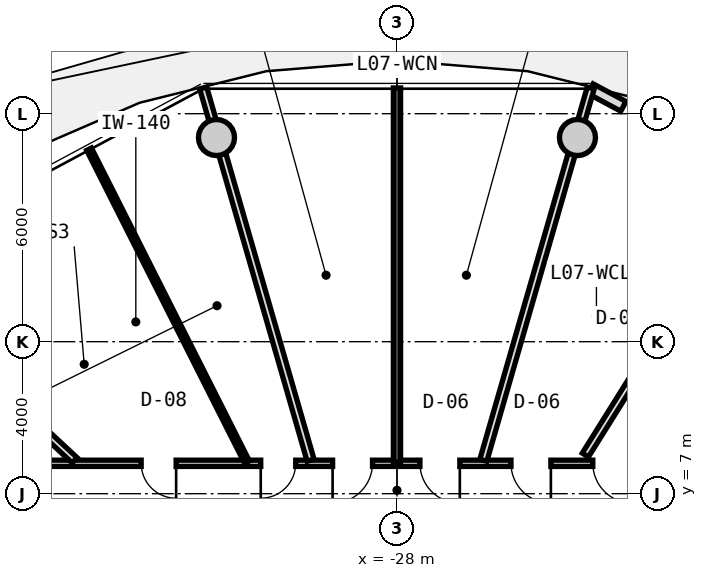
"""IFC4 building model, lengths in metres.
Left out: names, types, materials, properties, quantities, classifications, styles, units other than length and angle.
Written with IfcOpenShell. Run it as: python <this file> out.ifc"""

import sys

from ifc_helpers import new_model, si_unit, direction, frame, frame_2d, origin, origin_2d, place, context, subcontext, project, spatial, rectangle, circle, extrude, source, transform, mapped, element, fill, save


model = new_model("IFC4")
c1 = context("Model", 3, precision=1e-05, world=origin(), true_north=direction((0.0, 1.0)))
c2 = subcontext(c1, "Body", "Model", "MODEL_VIEW")
j1 = project(units=[si_unit("LENGTHUNIT", "METRE"), si_unit("PLANEANGLEUNIT", "RADIAN")], contexts=[c1])
p1 = place(None, origin())
s1 = spatial("IfcSite", under=j1, at=p1, CompositionType="ELEMENT")
p2 = place(p1, origin())
s2 = spatial("IfcBuilding", under=s1, at=p2, CompositionType="ELEMENT")
p3 = place(p2, frame((0.0, 0.0, 27.7)))
s3 = spatial("IfcBuildingStorey", under=s2, at=p3, CompositionType="ELEMENT", Elevation=27.7)
m1 = source(origin(), c2, "Body", "SweptSolid", [
    extrude(circle(Radius=0.475, at=origin_2d()), origin(), (0.0, 0.0, 1.0), 3.05),
])
for number, where, z_axis, x_axis in (
    (1, (-23.251, 16.373, 0.0), (0.0, 0.0, 1.0), (1.0, 0.0, 0.0)),
    (2, (-32.749, 16.373, 0.0), (0.0, 0.0, 1.0), (1.0, 0.0, 0.0)),
):
    element("IfcColumn", number, at=place(p3, frame(where, z_axis=z_axis, x_axis=x_axis)), inside=s3, PredefinedType="COLUMN", context=c2, shape_type="MappedRepresentation", body=[
        mapped(m1, transform((0.0, 0.0, 0.0), x_axis=(1.0, 0.0, 0.0), y_axis=(0.0, 1.0, 0.0), z_axis=(0.0, 0.0, 1.0), scale=1.0)),
    ])
m2 = source(origin(), c2, "Body", "SweptSolid", [
    extrude(rectangle(XDim=10.011, YDim=0.29, at=frame_2d((5.005, 0.0))), origin(), (0.0, 0.0, 1.0), 2.79),
])
p4 = place(p3, frame((-22.906, 17.657, 0.0), z_axis=(0.0, 0.0, 1.0), x_axis=(0.881272505317, -0.472608475773, 0.0)))
e3 = element("IfcWall", 3, at=p4, inside=s3, PredefinedType="SOLIDWALL", context=c2, shape_type="MappedRepresentation", body=[
    mapped(m2, transform((0.0, 0.0, 0.0), x_axis=(1.0, 0.0, 0.0), y_axis=(0.0, 1.0, 0.0), z_axis=(0.0, 0.0, 1.0), scale=1.0)),
])
p5 = place(p4, frame((0.98, 0.0, 0.0)))
e4 = element("IfcOpeningElement", 4, at=p5, cuts=e3, PredefinedType="OPENING", context=c2, shape_type="SweptSolid", body=[
    extrude(rectangle(XDim=1.15, YDim=2.25, at=frame_2d((0.575, 1.125))), frame((0.0, 0.155, 0.0), z_axis=(0.0, -1.0, 0.0), x_axis=(1.0, 0.0, 0.0)), (0.0, 0.0, 1.0), 0.31),
])
p6 = place(p4, frame((5.535, 0.0, 0.85)))
e5 = element("IfcOpeningElement", 5, at=p6, cuts=e3, PredefinedType="OPENING", context=c2, shape_type="SweptSolid", body=[
    extrude(rectangle(XDim=1.2, YDim=1.5, at=frame_2d((0.6, 0.75))), frame((0.0, 0.155, 0.0), z_axis=(0.0, -1.0, 0.0), x_axis=(1.0, 0.0, 0.0)), (0.0, 0.0, 1.0), 0.31),
])
m3 = source(origin(), c2, "Body", "SweptSolid", [
    extrude(rectangle(XDim=19.0, YDim=0.165, at=frame_2d((9.5, 0.0))), origin(), (0.0, 0.0, 1.0), 2.775),
])
p7 = place(p3, frame((-37.5, 7.8, 0.0), z_axis=(0.0, 0.0, 1.0), x_axis=(1.0, 0.0, 0.0)))
e6 = element("IfcWall", 6, at=p7, inside=s3, PredefinedType="PARTITIONING", context=c2, shape_type="MappedRepresentation", body=[
    mapped(m3, transform((0.0, 0.0, 0.0), x_axis=(1.0, 0.0, 0.0), y_axis=(0.0, 1.0, 0.0), z_axis=(0.0, 0.0, 1.0), scale=1.0)),
])
p8 = place(p7, frame((14.653, 0.0, 0.0)))
e7 = element("IfcOpeningElement", 7, at=p8, cuts=e6, PredefinedType="OPENING", context=c2, shape_type="SweptSolid", body=[
    extrude(rectangle(XDim=1.05, YDim=2.15, at=frame_2d((0.525, 1.075))), frame((0.0, 0.093, 0.0), z_axis=(0.0, -1.0, 0.0), x_axis=(1.0, 0.0, 0.0)), (0.0, 0.0, 1.0), 0.185),
])
p9 = place(p7, frame((12.5, 0.0, 0.0)))
e8 = element("IfcOpeningElement", 8, at=p9, cuts=e6, PredefinedType="OPENING", context=c2, shape_type="SweptSolid", body=[
    extrude(rectangle(XDim=1.05, YDim=2.15, at=frame_2d((0.525, 1.075))), frame((0.0, 0.093, 0.0), z_axis=(0.0, -1.0, 0.0), x_axis=(1.0, 0.0, 0.0)), (0.0, 0.0, 1.0), 0.185),
])
p10 = place(p7, frame((10.104, 0.0, 0.0)))
e9 = element("IfcOpeningElement", 9, at=p10, cuts=e6, PredefinedType="OPENING", context=c2, shape_type="SweptSolid", body=[
    extrude(rectangle(XDim=1.05, YDim=2.15, at=frame_2d((0.525, 1.075))), frame((0.0, 0.093, 0.0), z_axis=(0.0, -1.0, 0.0), x_axis=(1.0, 0.0, 0.0)), (0.0, 0.0, 1.0), 0.185),
])
p11 = place(p7, frame((7.806, 0.0, 0.0)))
e10 = element("IfcOpeningElement", 10, at=p11, cuts=e6, PredefinedType="OPENING", context=c2, shape_type="SweptSolid", body=[
    extrude(rectangle(XDim=1.05, YDim=2.15, at=frame_2d((0.525, 1.075))), frame((0.0, 0.093, 0.0), z_axis=(0.0, -1.0, 0.0), x_axis=(1.0, 0.0, 0.0)), (0.0, 0.0, 1.0), 0.185),
])
p12 = place(p7, frame((5.915, 0.0, 0.0)))
e11 = element("IfcOpeningElement", 11, at=p12, cuts=e6, PredefinedType="OPENING", context=c2, shape_type="SweptSolid", body=[
    extrude(rectangle(XDim=0.92, YDim=2.1, at=frame_2d((0.46, 1.05))), frame((0.0, 0.093, 0.0), z_axis=(0.0, -1.0, 0.0), x_axis=(1.0, 0.0, 0.0)), (0.0, 0.0, 1.0), 0.185),
])
p13 = place(p7, frame((2.769, 0.0, 0.0)))
e12 = element("IfcOpeningElement", 12, at=p13, cuts=e6, PredefinedType="OPENING", context=c2, shape_type="SweptSolid", body=[
    extrude(rectangle(XDim=0.92, YDim=2.1, at=frame_2d((0.46, 1.05))), frame((0.0, 0.093, 0.0), z_axis=(0.0, -1.0, 0.0), x_axis=(1.0, 0.0, 0.0)), (0.0, 0.0, 1.0), 0.185),
])
m4 = source(origin(), c2, "Body", "SweptSolid", [
    extrude(rectangle(XDim=10.196, YDim=0.19, at=frame_2d((5.098, 0.0))), origin(), (0.0, 0.0, 1.0), 2.225),
])
p14 = place(p3, frame((-25.727, 7.88, 0.0), z_axis=(0.0, 0.0, 1.0), x_axis=(0.277136420347, 0.960830580549, 0.0)))
e13 = element("IfcWall", 13, at=p14, inside=s3, PredefinedType="PARTITIONING", context=c2, shape_type="MappedRepresentation", body=[
    mapped(m4, transform((0.0, 0.0, 0.0), x_axis=(1.0, 0.0, 0.0), y_axis=(0.0, 1.0, 0.0), z_axis=(0.0, 0.0, 1.0), scale=1.0)),
])
m5 = source(origin(), c2, "Body", "SweptSolid", [
    extrude(rectangle(XDim=8.598, YDim=0.19, at=frame_2d((4.299, 0.0))), origin(), (0.0, 0.0, 1.0), 2.775),
])
p15 = place(p3, frame((-23.043, 8.017, 0.0), z_axis=(0.0, 0.0, 1.0), x_axis=(0.530039776395, 0.847972779893, 0.0)))
e14 = element("IfcWall", 14, at=p15, inside=s3, PredefinedType="PARTITIONING", context=c2, shape_type="MappedRepresentation", body=[
    mapped(m5, transform((0.0, 0.0, 0.0), x_axis=(1.0, 0.0, 0.0), y_axis=(0.0, 1.0, 0.0), z_axis=(0.0, 0.0, 1.0), scale=1.0)),
])
p16 = place(p3, frame((-30.273, 7.88, 0.0), z_axis=(0.0, 0.0, 1.0), x_axis=(-0.277136420347, 0.960830580549, 0.0)))
e15 = element("IfcWall", 15, at=p16, inside=s3, PredefinedType="PARTITIONING", context=c2, shape_type="MappedRepresentation", body=[
    mapped(m4, transform((0.0, 0.0, 0.0), x_axis=(1.0, 0.0, 0.0), y_axis=(0.0, 1.0, 0.0), z_axis=(0.0, 0.0, 1.0), scale=1.0)),
])
m6 = source(origin(), c2, "Body", "SweptSolid", [
    extrude(rectangle(XDim=9.846, YDim=0.19, at=frame_2d((4.923, 0.0))), origin(), (0.0, 0.0, 1.0), 2.775),
])
p17 = place(p3, frame((-28.0, 7.83, 0.0), z_axis=(0.0, 0.0, 1.0), x_axis=(0.0, 1.0, 0.0)))
e16 = element("IfcWall", 16, at=p17, inside=s3, PredefinedType="PARTITIONING", context=c2, shape_type="MappedRepresentation", body=[
    mapped(m6, transform((0.0, 0.0, 0.0), x_axis=(1.0, 0.0, 0.0), y_axis=(0.0, 1.0, 0.0), z_axis=(0.0, 0.0, 1.0), scale=1.0)),
])
m7 = source(origin(), c2, "Body", "SweptSolid", [
    extrude(rectangle(XDim=7.435, YDim=0.19, at=frame_2d((3.717, 0.0))), origin(), (0.0, 0.0, 1.0), 2.225),
])
p18 = place(p3, frame((-36.483, 7.88, 0.0), z_axis=(0.0, 0.0, 1.0), x_axis=(-0.732651956848, 0.680603489652, 0.0)))
e17 = element("IfcWall", 17, at=p18, inside=s3, PredefinedType="PARTITIONING", context=c2, shape_type="MappedRepresentation", body=[
    mapped(m7, transform((0.0, 0.0, 0.0), x_axis=(1.0, 0.0, 0.0), y_axis=(0.0, 1.0, 0.0), z_axis=(0.0, 0.0, 1.0), scale=1.0)),
])
m8 = source(origin(), c2, "Body", "SweptSolid", [
    extrude(rectangle(XDim=9.225, YDim=0.14, at=frame_2d((4.613, 0.0))), origin(), (0.0, 0.0, 1.0), 2.775),
])
p19 = place(p3, frame((-31.946, 7.83, 0.0), z_axis=(0.0, 0.0, 1.0), x_axis=(-0.450460543767, 0.892796336523, 0.0)))
e18 = element("IfcWall", 18, at=p19, inside=s3, PredefinedType="PARTITIONING", context=c2, shape_type="MappedRepresentation", body=[
    mapped(m8, transform((0.0, 0.0, 0.0), x_axis=(1.0, 0.0, 0.0), y_axis=(0.0, 1.0, 0.0), z_axis=(0.0, 0.0, 1.0), scale=1.0)),
])
m9 = source(origin(), c2, "Body", "SweptSolid", [
    extrude(rectangle(XDim=1.15, YDim=2.25, at=frame_2d((0.575, 1.125))), frame((0.0, 0.025, 0.0), z_axis=(0.0, -1.0, 0.0), x_axis=(1.0, 0.0, 0.0)), (0.0, 0.0, 1.0), 0.05),
])
p20 = place(p5, origin())
e19 = element("IfcDoor", 19, at=p20, inside=s3, OperationType="SINGLE_SWING_RIGHT", PredefinedType="DOOR", context=c2, shape_type="MappedRepresentation", body=[
    mapped(m9, transform((0.0, 0.0, 0.0), x_axis=(1.0, 0.0, 0.0), y_axis=(0.0, 1.0, 0.0), z_axis=(0.0, 0.0, 1.0), scale=1.0)),
])
fill(e4, e19)
m10 = source(origin(), c2, "Body", "SweptSolid", [
    extrude(rectangle(XDim=1.05, YDim=2.15, at=frame_2d((0.525, 1.075))), frame((0.0, 0.025, 0.0), z_axis=(0.0, -1.0, 0.0), x_axis=(1.0, 0.0, 0.0)), (0.0, 0.0, 1.0), 0.05),
])
p21 = place(p8, frame((1.05, 0.0, 0.0), z_axis=(0.0, 0.0, 1.0), x_axis=(-1.0, 0.0, 0.0)))
e20 = element("IfcDoor", 20, at=p21, inside=s3, OperationType="SINGLE_SWING_LEFT", PredefinedType="DOOR", context=c2, shape_type="MappedRepresentation", body=[
    mapped(m10, transform((0.0, 0.0, 0.0), x_axis=(1.0, 0.0, 0.0), y_axis=(0.0, 1.0, 0.0), z_axis=(0.0, 0.0, 1.0), scale=1.0)),
])
fill(e7, e20)
p22 = place(p9, frame((1.05, 0.0, 0.0), z_axis=(0.0, 0.0, 1.0), x_axis=(-1.0, 0.0, 0.0)))
e21 = element("IfcDoor", 21, at=p22, inside=s3, OperationType="SINGLE_SWING_LEFT", PredefinedType="DOOR", context=c2, shape_type="MappedRepresentation", body=[
    mapped(m10, transform((0.0, 0.0, 0.0), x_axis=(1.0, 0.0, 0.0), y_axis=(0.0, 1.0, 0.0), z_axis=(0.0, 0.0, 1.0), scale=1.0)),
])
fill(e8, e21)
p23 = place(p10, frame((1.05, 0.0, 0.0), z_axis=(0.0, 0.0, 1.0), x_axis=(-1.0, 0.0, 0.0)))
e22 = element("IfcDoor", 22, at=p23, inside=s3, OperationType="SINGLE_SWING_LEFT", PredefinedType="DOOR", context=c2, shape_type="MappedRepresentation", body=[
    mapped(m10, transform((0.0, 0.0, 0.0), x_axis=(1.0, 0.0, 0.0), y_axis=(0.0, 1.0, 0.0), z_axis=(0.0, 0.0, 1.0), scale=1.0)),
])
fill(e9, e22)
p24 = place(p11, frame((1.05, 0.0, 0.0), z_axis=(0.0, 0.0, 1.0), x_axis=(-1.0, 0.0, 0.0)))
e23 = element("IfcDoor", 23, at=p24, inside=s3, OperationType="SINGLE_SWING_RIGHT", PredefinedType="DOOR", context=c2, shape_type="MappedRepresentation", body=[
    mapped(m10, transform((0.0, 0.0, 0.0), x_axis=(1.0, 0.0, 0.0), y_axis=(0.0, 1.0, 0.0), z_axis=(0.0, 0.0, 1.0), scale=1.0)),
])
fill(e10, e23)
m11 = source(origin(), c2, "Body", "SweptSolid", [
    extrude(rectangle(XDim=0.92, YDim=2.1, at=frame_2d((0.46, 1.05))), frame((0.0, 0.025, 0.0), z_axis=(0.0, -1.0, 0.0), x_axis=(1.0, 0.0, 0.0)), (0.0, 0.0, 1.0), 0.05),
])
p25 = place(p12, frame((0.92, 0.0, 0.0), z_axis=(0.0, 0.0, 1.0), x_axis=(-1.0, 0.0, 0.0)))
e24 = element("IfcDoor", 24, at=p25, inside=s3, OperationType="SINGLE_SWING_RIGHT", PredefinedType="DOOR", context=c2, shape_type="MappedRepresentation", body=[
    mapped(m11, transform((0.0, 0.0, 0.0), x_axis=(1.0, 0.0, 0.0), y_axis=(0.0, 1.0, 0.0), z_axis=(0.0, 0.0, 1.0), scale=1.0)),
])
fill(e11, e24)
p26 = place(p13, frame((0.92, 0.0, 0.0), z_axis=(0.0, 0.0, 1.0), x_axis=(-1.0, 0.0, 0.0)))
e25 = element("IfcDoor", 25, at=p26, inside=s3, OperationType="SINGLE_SWING_LEFT", PredefinedType="DOOR", context=c2, shape_type="MappedRepresentation", body=[
    mapped(m11, transform((0.0, 0.0, 0.0), x_axis=(1.0, 0.0, 0.0), y_axis=(0.0, 1.0, 0.0), z_axis=(0.0, 0.0, 1.0), scale=1.0)),
])
fill(e12, e25)
save(model, sys.argv[1])
